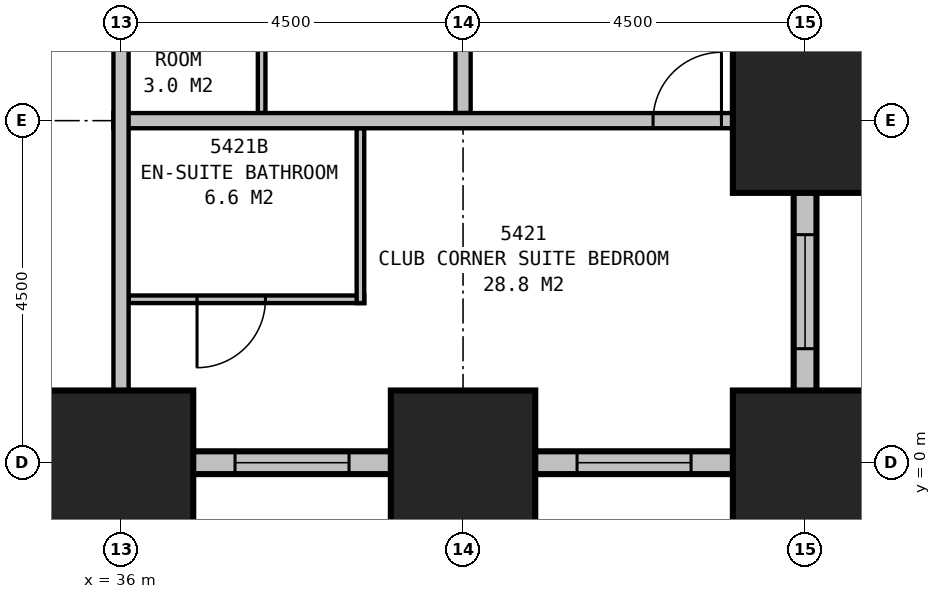
"""IFC4 building model, lengths in metres.
Left out: names, types, materials, properties, quantities, classifications, styles, units other than length and angle.
Written with IfcOpenShell. Run it as: python <this file> out.ifc"""

import sys

from ifc_helpers import new_model, si_unit, direction, frame, frame_2d, origin, origin_2d, place, context, subcontext, project, spatial, rectangle, extrude, element, fill, save


model = new_model("IFC4")
c1 = context("Model", 3, precision=1e-05, world=origin(), true_north=direction((0.0, 1.0)))
c2 = subcontext(c1, "Body", "Model", "MODEL_VIEW")
j1 = project(units=[si_unit("LENGTHUNIT", "METRE"), si_unit("PLANEANGLEUNIT", "RADIAN")], contexts=[c1])
p1 = place(None, origin())
s1 = spatial("IfcSite", under=j1, at=p1, CompositionType="ELEMENT")
p2 = place(p1, origin())
s2 = spatial("IfcBuilding", under=s1, at=p2, CompositionType="ELEMENT")
p3 = place(p2, frame((0.0, 0.0, 207.9)))
s3 = spatial("IfcBuildingStorey", under=s2, at=p3, CompositionType="ELEMENT", Elevation=207.9)
for number, where, z_axis, x_axis in (
    (1, (36.0, 0.0, 0.0), (0.0, 0.0, 1.0), (1.0, 0.0, 0.0)),
    (2, (40.5, 0.0, 0.0), (0.0, 0.0, 1.0), (1.0, 0.0, 0.0)),
    (3, (45.0, 0.0, 0.0), (0.0, 0.0, 1.0), (1.0, 0.0, 0.0)),
    (4, (45.0, 4.5, 0.0), (0.0, 0.0, 1.0), (1.0, 0.0, 0.0)),
):
    element("IfcColumn", number, at=place(p3, frame(where, z_axis=z_axis, x_axis=x_axis)), inside=s3, PredefinedType="COLUMN", context=c2, shape_type="SweptSolid", body=[
        extrude(rectangle(XDim=1.9, YDim=1.9, at=origin_2d()), origin(), (0.0, 0.0, 1.0), 3.5),
    ])
p4 = place(p3, frame((8.85, 0.0, 0.0), z_axis=(0.0, 0.0, 1.0), x_axis=(1.0, 0.0, 0.0)))
e5 = element("IfcWall", 5, at=p4, inside=s3, PredefinedType="STANDARD", context=c2, shape_type="SweptSolid", body=[
    extrude(rectangle(XDim=36.3, YDim=0.3, at=frame_2d((18.15, 0.0))), origin(), (0.0, 0.0, 1.0), 1.9),
])
p5 = place(p4, frame((1.65, 0.0, 0.5)))
e6 = element("IfcOpeningElement", 6, at=p5, cuts=e5, PredefinedType="OPENING", context=c2, shape_type="SweptSolid", body=[
    extrude(rectangle(XDim=1.5, YDim=1.2, at=frame_2d((0.75, 0.6))), frame((0.0, 0.16, 0.0), z_axis=(0.0, -1.0, 0.0), x_axis=(1.0, 0.0, 0.0)), (0.0, 0.0, 1.0), 0.32),
])
p6 = place(p4, frame((6.15, 0.0, 0.5)))
e7 = element("IfcOpeningElement", 7, at=p6, cuts=e5, PredefinedType="OPENING", context=c2, shape_type="SweptSolid", body=[
    extrude(rectangle(XDim=1.5, YDim=1.2, at=frame_2d((0.75, 0.6))), frame((0.0, 0.16, 0.0), z_axis=(0.0, -1.0, 0.0), x_axis=(1.0, 0.0, 0.0)), (0.0, 0.0, 1.0), 0.32),
])
p7 = place(p4, frame((10.65, 0.0, 0.5)))
e8 = element("IfcOpeningElement", 8, at=p7, cuts=e5, PredefinedType="OPENING", context=c2, shape_type="SweptSolid", body=[
    extrude(rectangle(XDim=1.5, YDim=1.2, at=frame_2d((0.75, 0.6))), frame((0.0, 0.16, 0.0), z_axis=(0.0, -1.0, 0.0), x_axis=(1.0, 0.0, 0.0)), (0.0, 0.0, 1.0), 0.32),
])
p8 = place(p4, frame((15.15, 0.0, 0.5)))
e9 = element("IfcOpeningElement", 9, at=p8, cuts=e5, PredefinedType="OPENING", context=c2, shape_type="SweptSolid", body=[
    extrude(rectangle(XDim=1.5, YDim=1.2, at=frame_2d((0.75, 0.6))), frame((0.0, 0.16, 0.0), z_axis=(0.0, -1.0, 0.0), x_axis=(1.0, 0.0, 0.0)), (0.0, 0.0, 1.0), 0.32),
])
p9 = place(p4, frame((19.65, 0.0, 0.5)))
e10 = element("IfcOpeningElement", 10, at=p9, cuts=e5, PredefinedType="OPENING", context=c2, shape_type="SweptSolid", body=[
    extrude(rectangle(XDim=1.5, YDim=1.2, at=frame_2d((0.75, 0.6))), frame((0.0, 0.16, 0.0), z_axis=(0.0, -1.0, 0.0), x_axis=(1.0, 0.0, 0.0)), (0.0, 0.0, 1.0), 0.32),
])
p10 = place(p4, frame((24.15, 0.0, 0.5)))
e11 = element("IfcOpeningElement", 11, at=p10, cuts=e5, PredefinedType="OPENING", context=c2, shape_type="SweptSolid", body=[
    extrude(rectangle(XDim=1.5, YDim=1.2, at=frame_2d((0.75, 0.6))), frame((0.0, 0.16, 0.0), z_axis=(0.0, -1.0, 0.0), x_axis=(1.0, 0.0, 0.0)), (0.0, 0.0, 1.0), 0.32),
])
p11 = place(p4, frame((28.65, 0.0, 0.5)))
e12 = element("IfcOpeningElement", 12, at=p11, cuts=e5, PredefinedType="OPENING", context=c2, shape_type="SweptSolid", body=[
    extrude(rectangle(XDim=1.5, YDim=1.2, at=frame_2d((0.75, 0.6))), frame((0.0, 0.16, 0.0), z_axis=(0.0, -1.0, 0.0), x_axis=(1.0, 0.0, 0.0)), (0.0, 0.0, 1.0), 0.32),
])
p12 = place(p4, frame((33.15, 0.0, 0.5)))
e13 = element("IfcOpeningElement", 13, at=p12, cuts=e5, PredefinedType="OPENING", context=c2, shape_type="SweptSolid", body=[
    extrude(rectangle(XDim=1.5, YDim=1.2, at=frame_2d((0.75, 0.6))), frame((0.0, 0.16, 0.0), z_axis=(0.0, -1.0, 0.0), x_axis=(1.0, 0.0, 0.0)), (0.0, 0.0, 1.0), 0.32),
])
p13 = place(p3, frame((45.0, -0.15, 0.0), z_axis=(0.0, 0.0, 1.0), x_axis=(0.0, 1.0, 0.0)))
e14 = element("IfcWall", 14, at=p13, inside=s3, PredefinedType="STANDARD", context=c2, shape_type="SweptSolid", body=[
    extrude(rectangle(XDim=4.8, YDim=0.3, at=frame_2d((2.4, 0.0))), origin(), (0.0, 0.0, 1.0), 1.9),
])
p14 = place(p13, frame((1.65, 0.0, 0.5)))
e15 = element("IfcOpeningElement", 15, at=p14, cuts=e14, PredefinedType="OPENING", context=c2, shape_type="SweptSolid", body=[
    extrude(rectangle(XDim=1.5, YDim=1.2, at=frame_2d((0.75, 0.6))), frame((0.0, 0.16, 0.0), z_axis=(0.0, -1.0, 0.0), x_axis=(1.0, 0.0, 0.0)), (0.0, 0.0, 1.0), 0.32),
])
p15 = place(p3, frame((44.85, 4.5, 0.0), z_axis=(0.0, 0.0, 1.0), x_axis=(1.0, 0.0, 0.0)))
e16 = element("IfcWall", 16, at=p15, inside=s3, PredefinedType="STANDARD", context=c2, shape_type="SweptSolid", body=[
    extrude(rectangle(XDim=4.3, YDim=0.3, at=frame_2d((2.15, 0.0))), origin(), (0.0, 0.0, 1.0), 1.9),
])
p16 = place(p15, frame((1.4, 0.0, 0.5)))
e17 = element("IfcOpeningElement", 17, at=p16, cuts=e16, PredefinedType="OPENING", context=c2, shape_type="SweptSolid", body=[
    extrude(rectangle(XDim=1.5, YDim=1.2, at=frame_2d((0.75, 0.6))), frame((0.0, 0.16, 0.0), z_axis=(0.0, -1.0, 0.0), x_axis=(1.0, 0.0, 0.0)), (0.0, 0.0, 1.0), 0.32),
])
p17 = place(p3, frame((49.017, 4.351, 0.0), z_axis=(0.0, 0.0, 1.0), x_axis=(-0.110433201132, 0.993883548555, 0.0)))
e18 = element("IfcWall", 18, at=p17, inside=s3, PredefinedType="STANDARD", context=c2, shape_type="SweptSolid", body=[
    extrude(rectangle(XDim=31.994, YDim=0.3, at=frame_2d((15.997, 0.0))), origin(), (0.0, 0.0, 1.0), 1.9),
])
p18 = place(p17, frame((1.664, 0.0, 0.5)))
e19 = element("IfcOpeningElement", 19, at=p18, cuts=e18, PredefinedType="OPENING", context=c2, shape_type="SweptSolid", body=[
    extrude(rectangle(XDim=1.5, YDim=1.2, at=frame_2d((0.75, 0.6))), frame((0.0, 0.16, 0.0), z_axis=(0.0, -1.0, 0.0), x_axis=(1.0, 0.0, 0.0)), (0.0, 0.0, 1.0), 0.32),
])
p19 = place(p17, frame((6.192, 0.0, 0.5)))
e20 = element("IfcOpeningElement", 20, at=p19, cuts=e18, PredefinedType="OPENING", context=c2, shape_type="SweptSolid", body=[
    extrude(rectangle(XDim=1.5, YDim=1.2, at=frame_2d((0.75, 0.6))), frame((0.0, 0.16, 0.0), z_axis=(0.0, -1.0, 0.0), x_axis=(1.0, 0.0, 0.0)), (0.0, 0.0, 1.0), 0.32),
])
p20 = place(p17, frame((10.719, 0.0, 0.5)))
e21 = element("IfcOpeningElement", 21, at=p20, cuts=e18, PredefinedType="OPENING", context=c2, shape_type="SweptSolid", body=[
    extrude(rectangle(XDim=1.5, YDim=1.2, at=frame_2d((0.75, 0.6))), frame((0.0, 0.16, 0.0), z_axis=(0.0, -1.0, 0.0), x_axis=(1.0, 0.0, 0.0)), (0.0, 0.0, 1.0), 0.32),
])
p21 = place(p17, frame((15.247, 0.0, 0.5)))
e22 = element("IfcOpeningElement", 22, at=p21, cuts=e18, PredefinedType="OPENING", context=c2, shape_type="SweptSolid", body=[
    extrude(rectangle(XDim=1.5, YDim=1.2, at=frame_2d((0.75, 0.6))), frame((0.0, 0.16, 0.0), z_axis=(0.0, -1.0, 0.0), x_axis=(1.0, 0.0, 0.0)), (0.0, 0.0, 1.0), 0.32),
])
p22 = place(p17, frame((19.775, 0.0, 0.5)))
e23 = element("IfcOpeningElement", 23, at=p22, cuts=e18, PredefinedType="OPENING", context=c2, shape_type="SweptSolid", body=[
    extrude(rectangle(XDim=1.5, YDim=1.2, at=frame_2d((0.75, 0.6))), frame((0.0, 0.16, 0.0), z_axis=(0.0, -1.0, 0.0), x_axis=(1.0, 0.0, 0.0)), (0.0, 0.0, 1.0), 0.32),
])
p23 = place(p17, frame((24.302, 0.0, 0.5)))
e24 = element("IfcOpeningElement", 24, at=p23, cuts=e18, PredefinedType="OPENING", context=c2, shape_type="SweptSolid", body=[
    extrude(rectangle(XDim=1.5, YDim=1.2, at=frame_2d((0.75, 0.6))), frame((0.0, 0.16, 0.0), z_axis=(0.0, -1.0, 0.0), x_axis=(1.0, 0.0, 0.0)), (0.0, 0.0, 1.0), 0.32),
])
p24 = place(p17, frame((28.83, 0.0, 0.5)))
e25 = element("IfcOpeningElement", 25, at=p24, cuts=e18, PredefinedType="OPENING", context=c2, shape_type="SweptSolid", body=[
    extrude(rectangle(XDim=1.5, YDim=1.2, at=frame_2d((0.75, 0.6))), frame((0.0, 0.16, 0.0), z_axis=(0.0, -1.0, 0.0), x_axis=(1.0, 0.0, 0.0)), (0.0, 0.0, 1.0), 0.32),
])
p25 = place(p3, frame((36.0, 10.6, 0.0), z_axis=(0.0, 0.0, 1.0), x_axis=(0.0, -1.0, 0.0)))
e26 = element("IfcWall", 26, at=p25, inside=s3, PredefinedType="PARTITIONING", context=c2, shape_type="SweptSolid", body=[
    extrude(rectangle(XDim=10.6, YDim=0.2, at=frame_2d((5.3, 0.0))), origin(), (0.0, 0.0, 1.0), 2.2),
])
p26 = place(p3, frame((35.9, 4.5, 0.0), z_axis=(0.0, 0.0, 1.0), x_axis=(1.0, 0.0, 0.0)))
e27 = element("IfcWall", 27, at=p26, inside=s3, PredefinedType="PARTITIONING", context=c2, shape_type="SweptSolid", body=[
    extrude(rectangle(XDim=9.1, YDim=0.2, at=frame_2d((4.55, 0.0))), origin(), (0.0, 0.0, 1.0), 3.25),
])
p27 = place(p26, frame((7.1, 0.0, 0.0)))
e28 = element("IfcOpeningElement", 28, at=p27, cuts=e27, PredefinedType="OPENING", context=c2, shape_type="SweptSolid", body=[
    extrude(rectangle(XDim=0.9, YDim=2.1, at=frame_2d((0.45, 1.05))), frame((0.0, 0.11, 0.0), z_axis=(0.0, -1.0, 0.0), x_axis=(1.0, 0.0, 0.0)), (0.0, 0.0, 1.0), 0.22),
])
p28 = place(p3, frame((40.5, 4.6, 0.0), z_axis=(0.0, 0.0, 1.0), x_axis=(0.0, 1.0, 0.0)))
e29 = element("IfcWall", 29, at=p28, inside=s3, PredefinedType="PARTITIONING", context=c2, shape_type="SweptSolid", body=[
    extrude(rectangle(XDim=8.8, YDim=0.2, at=frame_2d((4.4, 0.0))), origin(), (0.0, 0.0, 1.0), 2.2),
])
p29 = place(p28, frame((4.05, 0.0, 0.0)))
e30 = element("IfcOpeningElement", 30, at=p29, cuts=e29, PredefinedType="OPENING", context=c2, shape_type="SweptSolid", body=[
    extrude(rectangle(XDim=0.9, YDim=2.1, at=frame_2d((0.45, 1.05))), frame((0.0, 0.11, 0.0), z_axis=(0.0, -1.0, 0.0), x_axis=(1.0, 0.0, 0.0)), (0.0, 0.0, 1.0), 0.22),
])
p30 = place(p3, frame((37.85, 4.6, 0.0), z_axis=(0.0, 0.0, 1.0), x_axis=(0.0, 1.0, 0.0)))
e31 = element("IfcWall", 31, at=p30, inside=s3, PredefinedType="PLUMBINGWALL", context=c2, shape_type="SweptSolid", body=[
    extrude(rectangle(XDim=2.0, YDim=0.1, at=frame_2d((1.0, 0.0))), origin(), (0.0, 0.0, 1.0), 3.25),
])
p31 = place(p3, frame((39.15, 4.4, 0.0), z_axis=(0.0, 0.0, 1.0), x_axis=(0.0, -1.0, 0.0)))
e32 = element("IfcWall", 32, at=p31, inside=s3, PredefinedType="PLUMBINGWALL", context=c2, shape_type="SweptSolid", body=[
    extrude(rectangle(XDim=2.3, YDim=0.1, at=frame_2d((1.15, 0.0))), origin(), (0.0, 0.0, 1.0), 3.25),
])
p32 = place(p3, frame((36.1, 2.15, 0.0), z_axis=(0.0, 0.0, 1.0), x_axis=(1.0, 0.0, 0.0)))
e33 = element("IfcWall", 33, at=p32, inside=s3, PredefinedType="PLUMBINGWALL", context=c2, shape_type="SweptSolid", body=[
    extrude(rectangle(XDim=3.1, YDim=0.1, at=frame_2d((1.55, 0.0))), origin(), (0.0, 0.0, 1.0), 3.25),
])
p33 = place(p32, frame((1.8, 0.0, 0.0), z_axis=(0.0, 0.0, 1.0), x_axis=(-1.0, 0.0, 0.0)))
e34 = element("IfcOpeningElement", 34, at=p33, cuts=e33, PredefinedType="OPENING", context=c2, shape_type="SweptSolid", body=[
    extrude(rectangle(XDim=0.9, YDim=2.1, at=frame_2d((0.45, 1.05))), frame((0.0, 0.06, 0.0), z_axis=(0.0, -1.0, 0.0), x_axis=(1.0, 0.0, 0.0)), (0.0, 0.0, 1.0), 0.12),
])
p34 = place(p11, origin())
e35 = element("IfcWindow", 35, at=p34, inside=s3, PartitioningType="SINGLE_PANEL", PredefinedType="WINDOW", context=c2, shape_type="SweptSolid", body=[
    extrude(rectangle(XDim=1.5, YDim=1.2, at=frame_2d((0.75, 0.6))), frame((0.0, 0.03, 0.0), z_axis=(0.0, -1.0, 0.0), x_axis=(1.0, 0.0, 0.0)), (0.0, 0.0, 1.0), 0.06),
])
fill(e12, e35)
p35 = place(p12, origin())
e36 = element("IfcWindow", 36, at=p35, inside=s3, PartitioningType="SINGLE_PANEL", PredefinedType="WINDOW", context=c2, shape_type="SweptSolid", body=[
    extrude(rectangle(XDim=1.5, YDim=1.2, at=frame_2d((0.75, 0.6))), frame((0.0, 0.03, 0.0), z_axis=(0.0, -1.0, 0.0), x_axis=(1.0, 0.0, 0.0)), (0.0, 0.0, 1.0), 0.06),
])
fill(e13, e36)
p36 = place(p14, origin())
e37 = element("IfcWindow", 37, at=p36, inside=s3, PartitioningType="SINGLE_PANEL", PredefinedType="WINDOW", context=c2, shape_type="SweptSolid", body=[
    extrude(rectangle(XDim=1.5, YDim=1.2, at=frame_2d((0.75, 0.6))), frame((0.0, 0.03, 0.0), z_axis=(0.0, -1.0, 0.0), x_axis=(1.0, 0.0, 0.0)), (0.0, 0.0, 1.0), 0.06),
])
fill(e15, e37)
p37 = place(p27, origin())
e38 = element("IfcDoor", 38, at=p37, inside=s3, OperationType="SINGLE_SWING_RIGHT", PredefinedType="DOOR", context=c2, shape_type="SweptSolid", body=[
    extrude(rectangle(XDim=0.9, YDim=2.1, at=frame_2d((0.45, 1.05))), frame((0.0, 0.025, 0.0), z_axis=(0.0, -1.0, 0.0), x_axis=(1.0, 0.0, 0.0)), (0.0, 0.0, 1.0), 0.05),
])
fill(e28, e38)
p38 = place(p33, origin())
e39 = element("IfcDoor", 39, at=p38, inside=s3, OperationType="SINGLE_SWING_RIGHT", PredefinedType="DOOR", context=c2, shape_type="SweptSolid", body=[
    extrude(rectangle(XDim=0.9, YDim=2.1, at=frame_2d((0.45, 1.05))), frame((0.0, 0.025, 0.0), z_axis=(0.0, -1.0, 0.0), x_axis=(1.0, 0.0, 0.0)), (0.0, 0.0, 1.0), 0.05),
])
fill(e34, e39)
save(model, sys.argv[1])
